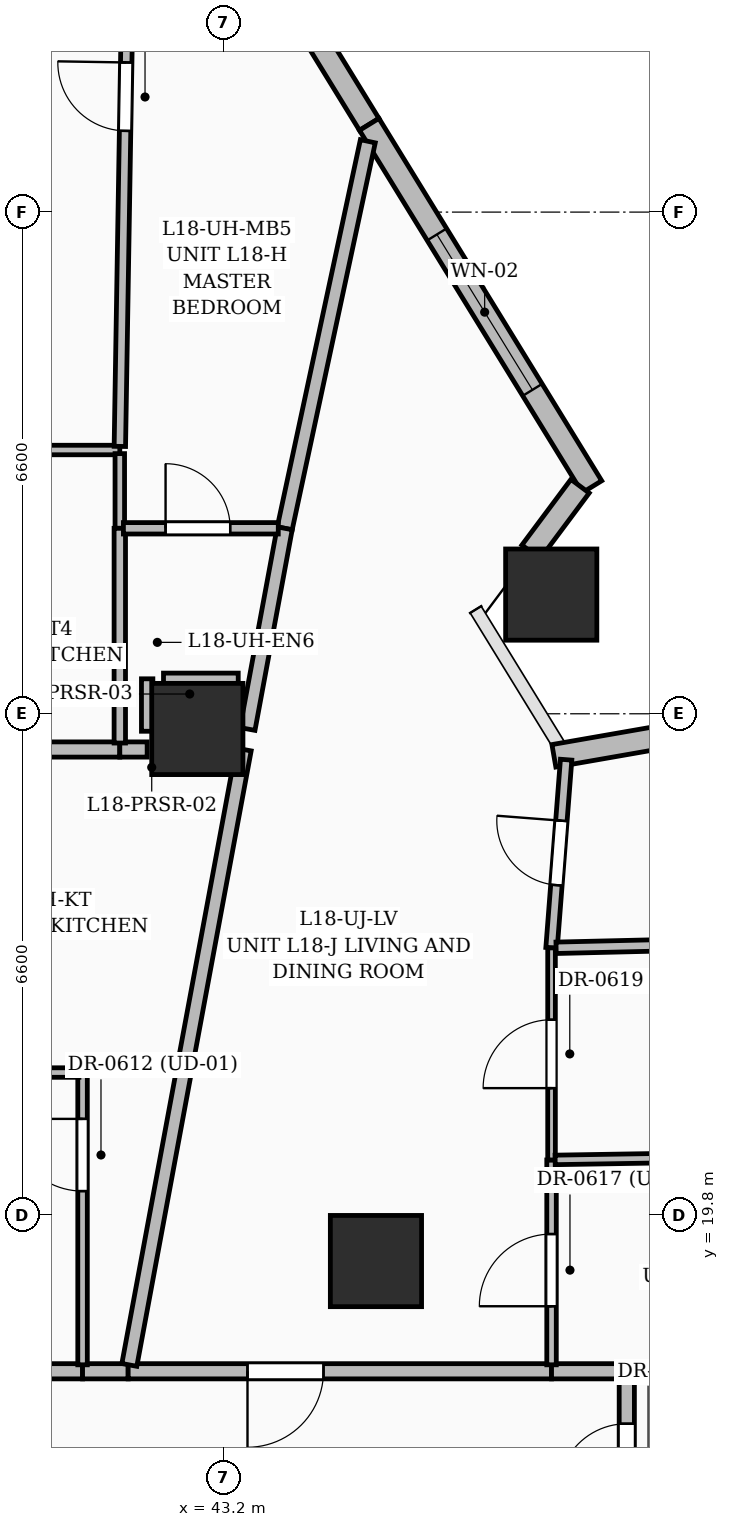
"""IFC4 building model, lengths in metres.
Left out: names, types, materials, properties, quantities, classifications, styles, units other than length and angle.
Written with IfcOpenShell. Run it as: python <this file> out.ifc"""

import sys

from ifc_helpers import new_model, si_unit, direction, frame, frame_2d, origin, origin_2d, place, context, subcontext, project, spatial, rectangle, extrude, element, fill, save


model = new_model("IFC4")
c1 = context("Model", 3, precision=1e-05, world=origin(), true_north=direction((0.0, 1.0)))
c2 = subcontext(c1, "Body", "Model", "MODEL_VIEW")
j1 = project(units=[si_unit("LENGTHUNIT", "METRE"), si_unit("PLANEANGLEUNIT", "RADIAN")], contexts=[c1])
p1 = place(None, origin())
s1 = spatial("IfcSite", under=j1, at=p1, CompositionType="ELEMENT")
p2 = place(p1, origin())
s2 = spatial("IfcBuilding", under=s1, at=p2, CompositionType="ELEMENT")
p3 = place(p2, frame((0.0, 0.0, 75.0)))
s3 = spatial("IfcBuildingStorey", under=s2, at=p3, CompositionType="ELEMENT", Elevation=75.0)
for number, where, z_axis, x_axis in (
    (1, (45.2, 19.2, 0.0), (0.0, 0.0, 1.0), (1.0, 0.0, 0.0)),
    (2, (42.85, 26.2, 0.0), (0.0, 0.0, 1.0), (1.0, 0.0, 0.0)),
    (3, (47.506, 27.968, 0.0), (0.0, 0.0, 1.0), (1.0, 0.0, 0.0)),
):
    element("IfcColumn", number, at=place(p3, frame(where, z_axis=z_axis, x_axis=x_axis)), inside=s3, PredefinedType="COLUMN", context=c2, shape_type="SweptSolid", body=[
        extrude(rectangle(XDim=1.2, YDim=1.2, at=origin_2d()), origin(), (0.0, 0.0, 1.0), 3.6),
    ])
p4 = place(p3, frame((42.153, 38.967, 0.0), z_axis=(0.0, 0.0, 1.0), x_axis=(0.523687465278, -0.851910464022, 0.0)))
e4 = element("IfcWall", 4, at=p4, inside=s3, PredefinedType="SOLIDWALL", context=c2, shape_type="SweptSolid", body=[
    extrude(rectangle(XDim=5.649, YDim=0.3, at=frame_2d((2.825, 0.0))), origin(), (0.0, 0.0, 1.0), 3.35),
])
p5 = place(p4, frame((2.228, 0.0, 0.8)))
e5 = element("IfcOpeningElement", 5, at=p5, cuts=e4, PredefinedType="OPENING", context=c2, shape_type="SweptSolid", body=[
    extrude(rectangle(XDim=1.2, YDim=1.8, at=frame_2d((0.6, 0.9))), frame((0.0, 0.16, 0.0), z_axis=(0.0, -1.0, 0.0), x_axis=(1.0, 0.0, 0.0)), (0.0, 0.0, 1.0), 0.32),
])
p6 = place(p3, frame((45.111, 34.154, 0.0), z_axis=(0.0, 0.0, 1.0), x_axis=(0.523710369238, -0.851896384047, 0.0)))
e6 = element("IfcWall", 6, at=p6, inside=s3, PredefinedType="SOLIDWALL", context=c2, shape_type="SweptSolid", body=[
    extrude(rectangle(XDim=5.596, YDim=0.3, at=frame_2d((2.798, 0.0))), origin(), (0.0, 0.0, 1.0), 3.35),
])
p7 = place(p6, frame((1.7, 0.0, 0.6)))
e7 = element("IfcOpeningElement", 7, at=p7, cuts=e6, PredefinedType="OPENING", context=c2, shape_type="SweptSolid", body=[
    extrude(rectangle(XDim=2.4, YDim=2.1, at=frame_2d((1.2, 1.05))), frame((0.0, 0.16, 0.0), z_axis=(0.0, -1.0, 0.0), x_axis=(1.0, 0.0, 0.0)), (0.0, 0.0, 1.0), 0.32),
])
p8 = place(p3, frame((47.885, 29.394, 0.0), z_axis=(0.0, 0.0, 1.0), x_axis=(-0.598186461049, -0.801356947819, 0.0)))
e8 = element("IfcWall", 8, at=p8, inside=s3, PredefinedType="SOLIDWALL", context=c2, shape_type="SweptSolid", body=[
    extrude(rectangle(XDim=1.078, YDim=0.3, at=frame_2d((0.539, 0.0))), origin(), (0.0, 0.0, 1.0), 2.375),
])
p9 = place(p3, frame((47.541, 25.847, 0.0), z_axis=(0.0, 0.0, 1.0), x_axis=(0.985095505459, 0.172008270511, 0.0)))
e9 = element("IfcWall", 9, at=p9, inside=s3, PredefinedType="SOLIDWALL", context=c2, shape_type="SweptSolid", body=[
    extrude(rectangle(XDim=2.594, YDim=0.3, at=frame_2d((1.297, 0.0))), origin(), (0.0, 0.0, 1.0), 2.375),
])
p10 = place(p3, frame((48.5, 15.47, 0.0), z_axis=(0.0, 0.0, 1.0), x_axis=(0.0, 1.0, 0.0)))
e10 = element("IfcWall", 10, at=p10, inside=s3, PredefinedType="PARTITIONING", context=c2, shape_type="SweptSolid", body=[
    extrude(rectangle(XDim=2.28, YDim=0.2, at=frame_2d((1.14, 0.0))), origin(), (0.0, 0.0, 1.0), 2.345),
])
p11 = place(p10, frame((0.69, 0.0, 0.0)))
e11 = element("IfcOpeningElement", 11, at=p11, cuts=e10, PredefinedType="OPENING", context=c2, shape_type="SweptSolid", body=[
    extrude(rectangle(XDim=0.9, YDim=2.1, at=frame_2d((0.45, 1.05))), frame((0.0, 0.11, 0.0), z_axis=(0.0, -1.0, 0.0), x_axis=(1.0, 0.0, 0.0)), (0.0, 0.0, 1.0), 0.22),
])
p12 = place(p3, frame((41.34, 17.75, 0.0), z_axis=(0.0, 0.0, 1.0), x_axis=(-1.0, 0.0, 0.0)))
e12 = element("IfcWall", 12, at=p12, inside=s3, PredefinedType="PARTITIONING", context=c2, shape_type="SweptSolid", body=[
    extrude(rectangle(XDim=6.47, YDim=0.2, at=frame_2d((3.235, 0.0))), origin(), (0.0, 0.0, 1.0), 3.35),
])
p13 = place(p12, frame((2.735, 0.0, 0.0)))
e13 = element("IfcOpeningElement", 13, at=p13, cuts=e12, PredefinedType="OPENING", context=c2, shape_type="SweptSolid", body=[
    extrude(rectangle(XDim=1.0, YDim=2.2, at=frame_2d((0.5, 1.1))), frame((0.0, 0.11, 0.0), z_axis=(0.0, -1.0, 0.0), x_axis=(1.0, 0.0, 0.0)), (0.0, 0.0, 1.0), 0.22),
])
p14 = place(p3, frame((41.94, 17.75, 0.0), z_axis=(0.0, 0.0, 1.0), x_axis=(-1.0, 0.0, 0.0)))
e14 = element("IfcWall", 14, at=p14, inside=s3, PredefinedType="PARTITIONING", context=c2, shape_type="SweptSolid", body=[
    extrude(rectangle(XDim=0.6, YDim=0.2, at=frame_2d((0.3, 0.0))), origin(), (0.0, 0.0, 1.0), 3.35),
])
p15 = place(p3, frame((47.51, 17.75, 0.0), z_axis=(0.0, 0.0, 1.0), x_axis=(-1.0, 0.0, 0.0)))
e15 = element("IfcWall", 15, at=p15, inside=s3, PredefinedType="PARTITIONING", context=c2, shape_type="SweptSolid", body=[
    extrude(rectangle(XDim=5.57, YDim=0.2, at=frame_2d((2.785, 0.0))), origin(), (0.0, 0.0, 1.0), 2.309),
])
p16 = place(p15, frame((3.0, 0.0, 0.0)))
e16 = element("IfcOpeningElement", 16, at=p16, cuts=e15, PredefinedType="OPENING", context=c2, shape_type="SweptSolid", body=[
    extrude(rectangle(XDim=1.0, YDim=2.2, at=frame_2d((0.5, 1.1))), frame((0.0, 0.11, 0.0), z_axis=(0.0, -1.0, 0.0), x_axis=(1.0, 0.0, 0.0)), (0.0, 0.0, 1.0), 0.22),
])
p17 = place(p3, frame((48.415, 17.75, 0.0), z_axis=(0.0, 0.0, 1.0), x_axis=(-1.0, 0.0, 0.0)))
e17 = element("IfcWall", 17, at=p17, inside=s3, PredefinedType="PARTITIONING", context=c2, shape_type="SweptSolid", body=[
    extrude(rectangle(XDim=0.905, YDim=0.2, at=frame_2d((0.453, 0.0))), origin(), (0.0, 0.0, 1.0), 2.911),
])
p18 = place(p3, frame((54.983, 17.844, 0.0), z_axis=(0.0, 0.0, 1.0), x_axis=(-0.999894330503, -0.014537118977, 0.0)))
e18 = element("IfcWall", 18, at=p18, inside=s3, PredefinedType="PARTITIONING", context=c2, shape_type="SweptSolid", body=[
    extrude(rectangle(XDim=6.399, YDim=0.2, at=frame_2d((3.199, 0.0))), origin(), (0.0, 0.0, 1.0), 2.345),
])
p19 = place(p3, frame((41.34, 17.835, 0.0), z_axis=(0.0, 0.0, 1.0), x_axis=(0.0, 1.0, 0.0)))
e19 = element("IfcWall", 19, at=p19, inside=s3, PredefinedType="PARTITIONING", context=c2, shape_type="SweptSolid", body=[
    extrude(rectangle(XDim=3.845, YDim=0.125, at=frame_2d((1.922, 0.0))), origin(), (0.0, 0.0, 1.0), 3.35),
])
p20 = place(p19, frame((2.285, 0.0, 0.0)))
e20 = element("IfcOpeningElement", 20, at=p20, cuts=e19, PredefinedType="OPENING", context=c2, shape_type="SweptSolid", body=[
    extrude(rectangle(XDim=0.95, YDim=2.2, at=frame_2d((0.475, 1.1))), frame((0.0, 0.072, 0.0), z_axis=(0.0, -1.0, 0.0), x_axis=(1.0, 0.0, 0.0)), (0.0, 0.0, 1.0), 0.145),
])
p21 = place(p3, frame((41.292, 21.68, 0.0), z_axis=(0.0, 0.0, 1.0), x_axis=(-1.0, 0.0, 0.0)))
e21 = element("IfcWall", 21, at=p21, inside=s3, PredefinedType="PARTITIONING", context=c2, shape_type="SweptSolid", body=[
    extrude(rectangle(XDim=2.742, YDim=0.125, at=frame_2d((1.371, 0.0))), origin(), (0.0, 0.0, 1.0), 3.35),
])
p22 = place(p3, frame((41.956, 17.833, 0.0), z_axis=(0.0, 0.0, 1.0), x_axis=(0.182682671213, 0.98317192883, 0.0)))
e22 = element("IfcWall", 22, at=p22, inside=s3, PredefinedType="PARTITIONING", context=c2, shape_type="SweptSolid", body=[
    extrude(rectangle(XDim=8.235, YDim=0.2, at=frame_2d((4.118, 0.0))), origin(), (0.0, 0.0, 1.0), 2.309),
])
p23 = place(p3, frame((41.83, 25.93, 0.0), z_axis=(0.0, 0.0, 1.0), x_axis=(-1.0, 0.0, 0.0)))
e23 = element("IfcWall", 23, at=p23, inside=s3, PredefinedType="PARTITIONING", context=c2, shape_type="SweptSolid", body=[
    extrude(rectangle(XDim=3.233, YDim=0.2, at=frame_2d((1.616, 0.0))), origin(), (0.0, 0.0, 1.0), 2.309),
])
p24 = place(p3, frame((42.19, 25.93, 0.0), z_axis=(0.0, 0.0, 1.0), x_axis=(-1.0, 0.0, 0.0)))
e24 = element("IfcWall", 24, at=p24, inside=s3, PredefinedType="PARTITIONING", context=c2, shape_type="SweptSolid", body=[
    extrude(rectangle(XDim=0.36, YDim=0.2, at=frame_2d((0.18, 0.0))), origin(), (0.0, 0.0, 1.0), 2.309),
])
p25 = place(p3, frame((47.51, 23.32, 0.0), z_axis=(0.0, 0.0, 1.0), x_axis=(0.077275386284, 0.997009786649, 0.0)))
e25 = element("IfcWall", 25, at=p25, inside=s3, PredefinedType="PARTITIONING", context=c2, shape_type="SweptSolid", body=[
    extrude(rectangle(XDim=2.483, YDim=0.15, at=frame_2d((1.242, 0.0))), origin(), (0.0, 0.0, 1.0), 3.35),
])
p26 = place(p25, frame((0.828, 0.0, 0.0)))
e26 = element("IfcOpeningElement", 26, at=p26, cuts=e25, PredefinedType="OPENING", context=c2, shape_type="SweptSolid", body=[
    extrude(rectangle(XDim=0.85, YDim=2.1, at=frame_2d((0.425, 1.05))), frame((0.0, 0.085, 0.0), z_axis=(0.0, -1.0, 0.0), x_axis=(1.0, 0.0, 0.0)), (0.0, 0.0, 1.0), 0.17),
])
p27 = place(p3, frame((47.51, 17.835, 0.0), z_axis=(0.0, 0.0, 1.0), x_axis=(0.0, 1.0, 0.0)))
e27 = element("IfcWall", 27, at=p27, inside=s3, PredefinedType="PARTITIONING", context=c2, shape_type="SweptSolid", body=[
    extrude(rectangle(XDim=2.695, YDim=0.125, at=frame_2d((1.348, 0.0))), origin(), (0.0, 0.0, 1.0), 2.911),
])
p28 = place(p27, frame((0.771, 0.0, 0.0)))
e28 = element("IfcOpeningElement", 28, at=p28, cuts=e27, PredefinedType="OPENING", context=c2, shape_type="SweptSolid", body=[
    extrude(rectangle(XDim=0.95, YDim=2.2, at=frame_2d((0.475, 1.1))), frame((0.0, 0.072, 0.0), z_axis=(0.0, -1.0, 0.0), x_axis=(1.0, 0.0, 0.0)), (0.0, 0.0, 1.0), 0.145),
])
p29 = place(p3, frame((47.51, 20.53, 0.0), z_axis=(0.0, 0.0, 1.0), x_axis=(0.0, 1.0, 0.0)))
e29 = element("IfcWall", 29, at=p29, inside=s3, PredefinedType="PARTITIONING", context=c2, shape_type="SweptSolid", body=[
    extrude(rectangle(XDim=2.79, YDim=0.1, at=frame_2d((1.395, 0.0))), origin(), (0.0, 0.0, 1.0), 2.911),
])
p30 = place(p29, frame((0.945, 0.0, 0.0)))
e30 = element("IfcOpeningElement", 30, at=p30, cuts=e29, PredefinedType="OPENING", context=c2, shape_type="SweptSolid", body=[
    extrude(rectangle(XDim=0.9, YDim=2.15, at=frame_2d((0.45, 1.075))), frame((0.0, 0.06, 0.0), z_axis=(0.0, -1.0, 0.0), x_axis=(1.0, 0.0, 0.0)), (0.0, 0.0, 1.0), 0.12),
])
p31 = place(p3, frame((45.093, 33.932, 0.0), z_axis=(0.0, 0.0, 1.0), x_axis=(-0.209881245986, -0.977726885476, 0.0)))
e31 = element("IfcWall", 31, at=p31, inside=s3, PredefinedType="PARTITIONING", context=c2, shape_type="SweptSolid", body=[
    extrude(rectangle(XDim=5.208, YDim=0.2, at=frame_2d((2.604, 0.0))), origin(), (0.0, 0.0, 1.0), 2.37),
])
p32 = place(p3, frame((44.0, 28.84, 0.0), z_axis=(0.0, 0.0, 1.0), x_axis=(-0.18247668152, -0.983210181345, 0.0)))
e32 = element("IfcWall", 32, at=p32, inside=s3, PredefinedType="PARTITIONING", context=c2, shape_type="SweptSolid", body=[
    extrude(rectangle(XDim=2.685, YDim=0.2, at=frame_2d((1.343, 0.0))), origin(), (0.0, 0.0, 1.0), 2.911),
])
p33 = place(p3, frame((47.57, 23.321, 0.0), z_axis=(0.0, 0.0, 1.0), x_axis=(0.999720663017, 0.023634634246, 0.0)))
e33 = element("IfcWall", 33, at=p33, inside=s3, PredefinedType="PARTITIONING", context=c2, shape_type="SweptSolid", body=[
    extrude(rectangle(XDim=4.008, YDim=0.15, at=frame_2d((2.004, 0.0))), origin(), (0.0, 0.0, 1.0), 2.37),
])
p34 = place(p3, frame((53.298, 20.625, 0.0), z_axis=(0.0, 0.0, 1.0), x_axis=(-0.9998645785, -0.016456751239, 0.0)))
e34 = element("IfcWall", 34, at=p34, inside=s3, PredefinedType="PARTITIONING", context=c2, shape_type="SweptSolid", body=[
    extrude(rectangle(XDim=5.741, YDim=0.125, at=frame_2d((2.871, 0.0))), origin(), (0.0, 0.0, 1.0), 2.911),
])
p35 = place(p3, frame((37.655, 29.87, 0.0), z_axis=(0.0, 0.0, 1.0), x_axis=(1.0, 0.0, 0.0)))
e35 = element("IfcWall", 35, at=p35, inside=s3, PredefinedType="PARTITIONING", context=c2, shape_type="SweptSolid", body=[
    extrude(rectangle(XDim=4.175, YDim=0.125, at=frame_2d((2.087, 0.0))), origin(), (0.0, 0.0, 1.0), 3.35),
])
p36 = place(p35, frame((1.57, 0.0, 0.0)))
e36 = element("IfcOpeningElement", 36, at=p36, cuts=e35, PredefinedType="OPENING", context=c2, shape_type="SweptSolid", body=[
    extrude(rectangle(XDim=0.95, YDim=2.2, at=frame_2d((0.475, 1.1))), frame((0.0, 0.072, 0.0), z_axis=(0.0, -1.0, 0.0), x_axis=(1.0, 0.0, 0.0)), (0.0, 0.0, 1.0), 0.145),
])
p37 = place(p3, frame((41.831, 29.917, 0.0), z_axis=(0.0, 0.0, 1.0), x_axis=(0.016599696118, 0.999862215552, 0.0)))
e37 = element("IfcWall", 37, at=p37, inside=s3, PredefinedType="PARTITIONING", context=c2, shape_type="SweptSolid", body=[
    extrude(rectangle(XDim=9.06, YDim=0.15, at=frame_2d((4.53, 0.0))), origin(), (0.0, 0.0, 1.0), 2.345),
])
p38 = place(p37, frame((4.152, 0.0, 0.0)))
e38 = element("IfcOpeningElement", 38, at=p38, cuts=e37, PredefinedType="OPENING", context=c2, shape_type="SweptSolid", body=[
    extrude(rectangle(XDim=0.9, YDim=2.15, at=frame_2d((0.45, 1.075))), frame((0.0, 0.085, 0.0), z_axis=(0.0, -1.0, 0.0), x_axis=(1.0, 0.0, 0.0)), (0.0, 0.0, 1.0), 0.17),
])
p39 = place(p3, frame((41.83, 28.84, 0.0), z_axis=(0.0, 0.0, 1.0), x_axis=(0.0, 1.0, 0.0)))
e39 = element("IfcWall", 39, at=p39, inside=s3, PredefinedType="PARTITIONING", context=c2, shape_type="SweptSolid", body=[
    extrude(rectangle(XDim=0.982, YDim=0.125, at=frame_2d((0.491, 0.0))), origin(), (0.0, 0.0, 1.0), 2.911),
])
p40 = place(p3, frame((41.83, 26.015, 0.0), z_axis=(0.0, 0.0, 1.0), x_axis=(0.0, 1.0, 0.0)))
e40 = element("IfcWall", 40, at=p40, inside=s3, PredefinedType="PARTITIONING", context=c2, shape_type="SweptSolid", body=[
    extrude(rectangle(XDim=2.825, YDim=0.15, at=frame_2d((1.413, 0.0))), origin(), (0.0, 0.0, 1.0), 2.309),
])
p41 = place(p3, frame((41.877, 28.84, 0.0), z_axis=(0.0, 0.0, 1.0), x_axis=(1.0, 0.0, 0.0)))
e41 = element("IfcWall", 41, at=p41, inside=s3, PredefinedType="PARTITIONING", context=c2, shape_type="SweptSolid", body=[
    extrude(rectangle(XDim=2.038, YDim=0.15, at=frame_2d((1.019, 0.0))), origin(), (0.0, 0.0, 1.0), 2.345),
])
p42 = place(p41, frame((0.555, 0.0, 0.0)))
e42 = element("IfcOpeningElement", 42, at=p42, cuts=e41, PredefinedType="OPENING", context=c2, shape_type="SweptSolid", body=[
    extrude(rectangle(XDim=0.85, YDim=2.1, at=frame_2d((0.425, 1.05))), frame((0.0, 0.085, 0.0), z_axis=(0.0, -1.0, 0.0), x_axis=(1.0, 0.0, 0.0)), (0.0, 0.0, 1.0), 0.17),
])
p43 = place(p3, frame((42.19, 26.17, 0.0), z_axis=(0.0, 0.0, 1.0), x_axis=(0.0, 1.0, 0.0)))
e43 = element("IfcWall", 43, at=p43, inside=s3, PredefinedType="PARTITIONING", context=c2, shape_type="SweptSolid", body=[
    extrude(rectangle(XDim=0.69, YDim=0.15, at=frame_2d((0.345, 0.0))), origin(), (0.0, 0.0, 1.0), 2.309),
])
p44 = place(p3, frame((42.405, 26.86, 0.0), z_axis=(0.0, 0.0, 1.0), x_axis=(1.0, 0.0, 0.0)))
e44 = element("IfcWall", 44, at=p44, inside=s3, PredefinedType="PARTITIONING", context=c2, shape_type="SweptSolid", body=[
    extrude(rectangle(XDim=0.983, YDim=0.15, at=frame_2d((0.491, 0.0))), origin(), (0.0, 0.0, 1.0), 2.345),
])
p45 = place(p7, origin())
e45 = element("IfcWindow", 45, at=p45, inside=s3, PartitioningType="SINGLE_PANEL", PredefinedType="WINDOW", context=c2, shape_type="SweptSolid", body=[
    extrude(rectangle(XDim=2.4, YDim=2.1, at=frame_2d((1.2, 1.05))), frame((0.0, 0.03, 0.0), z_axis=(0.0, -1.0, 0.0), x_axis=(1.0, 0.0, 0.0)), (0.0, 0.0, 1.0), 0.06),
])
fill(e7, e45)
p46 = place(p11, origin())
e46 = element("IfcDoor", 46, at=p46, inside=s3, OperationType="SINGLE_SWING_LEFT", PredefinedType="DOOR", context=c2, shape_type="SweptSolid", body=[
    extrude(rectangle(XDim=0.9, YDim=2.1, at=frame_2d((0.45, 1.05))), frame((0.0, 0.025, 0.0), z_axis=(0.0, -1.0, 0.0), x_axis=(1.0, 0.0, 0.0)), (0.0, 0.0, 1.0), 0.05),
])
fill(e11, e46)
p47 = place(p20, origin())
e47 = element("IfcDoor", 47, at=p47, inside=s3, OperationType="SINGLE_SWING_RIGHT", PredefinedType="DOOR", context=c2, shape_type="SweptSolid", body=[
    extrude(rectangle(XDim=0.95, YDim=2.2, at=frame_2d((0.475, 1.1))), frame((0.0, 0.025, 0.0), z_axis=(0.0, -1.0, 0.0), x_axis=(1.0, 0.0, 0.0)), (0.0, 0.0, 1.0), 0.05),
])
fill(e20, e47)
p48 = place(p16, origin())
e48 = element("IfcDoor", 48, at=p48, inside=s3, OperationType="SINGLE_SWING_RIGHT", PredefinedType="DOOR", context=c2, shape_type="SweptSolid", body=[
    extrude(rectangle(XDim=1.0, YDim=2.2, at=frame_2d((0.5, 1.1))), frame((0.0, 0.025, 0.0), z_axis=(0.0, -1.0, 0.0), x_axis=(1.0, 0.0, 0.0)), (0.0, 0.0, 1.0), 0.05),
])
fill(e16, e48)
p49 = place(p28, origin())
e49 = element("IfcDoor", 49, at=p49, inside=s3, OperationType="SINGLE_SWING_LEFT", PredefinedType="DOOR", context=c2, shape_type="SweptSolid", body=[
    extrude(rectangle(XDim=0.95, YDim=2.2, at=frame_2d((0.475, 1.1))), frame((0.0, 0.025, 0.0), z_axis=(0.0, -1.0, 0.0), x_axis=(1.0, 0.0, 0.0)), (0.0, 0.0, 1.0), 0.05),
])
fill(e28, e49)
p50 = place(p26, origin())
e50 = element("IfcDoor", 50, at=p50, inside=s3, OperationType="SINGLE_SWING_RIGHT", PredefinedType="DOOR", context=c2, shape_type="SweptSolid", body=[
    extrude(rectangle(XDim=0.85, YDim=2.1, at=frame_2d((0.425, 1.05))), frame((0.0, 0.025, 0.0), z_axis=(0.0, -1.0, 0.0), x_axis=(1.0, 0.0, 0.0)), (0.0, 0.0, 1.0), 0.05),
])
fill(e26, e50)
p51 = place(p30, origin())
e51 = element("IfcDoor", 51, at=p51, inside=s3, OperationType="SINGLE_SWING_LEFT", PredefinedType="DOOR", context=c2, shape_type="SweptSolid", body=[
    extrude(rectangle(XDim=0.9, YDim=2.15, at=frame_2d((0.45, 1.075))), frame((0.0, 0.025, 0.0), z_axis=(0.0, -1.0, 0.0), x_axis=(1.0, 0.0, 0.0)), (0.0, 0.0, 1.0), 0.05),
])
fill(e30, e51)
p52 = place(p38, origin())
e52 = element("IfcDoor", 52, at=p52, inside=s3, OperationType="SINGLE_SWING_RIGHT", PredefinedType="DOOR", context=c2, shape_type="SweptSolid", body=[
    extrude(rectangle(XDim=0.9, YDim=2.15, at=frame_2d((0.45, 1.075))), frame((0.0, 0.025, 0.0), z_axis=(0.0, -1.0, 0.0), x_axis=(1.0, 0.0, 0.0)), (0.0, 0.0, 1.0), 0.05),
])
fill(e38, e52)
p53 = place(p42, origin())
e53 = element("IfcDoor", 53, at=p53, inside=s3, OperationType="SINGLE_SWING_LEFT", PredefinedType="DOOR", context=c2, shape_type="SweptSolid", body=[
    extrude(rectangle(XDim=0.85, YDim=2.1, at=frame_2d((0.425, 1.05))), frame((0.0, 0.025, 0.0), z_axis=(0.0, -1.0, 0.0), x_axis=(1.0, 0.0, 0.0)), (0.0, 0.0, 1.0), 0.05),
])
fill(e42, e53)
save(model, sys.argv[1])
